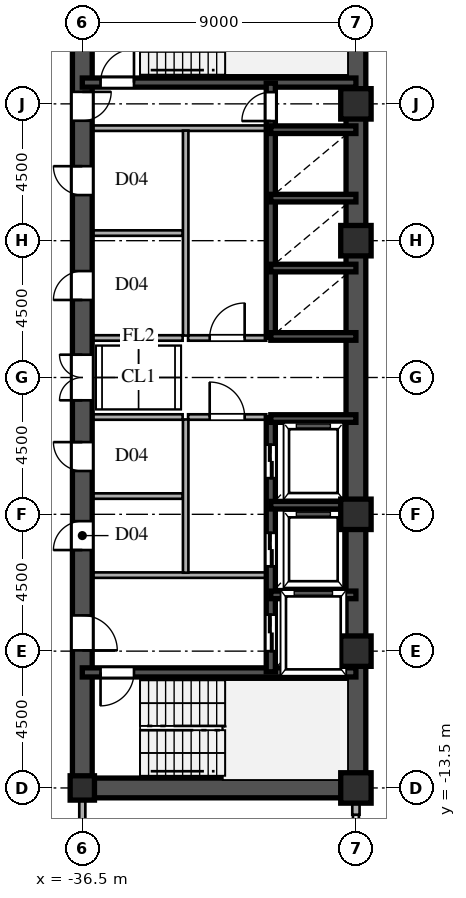
"""IFC4 building model, lengths in metres.
Left out: names, types, materials, properties, quantities, classifications, styles, units other than length and angle.
Written with IfcOpenShell. Run it as: python <this file> out.ifc"""

import sys

from ifc_helpers import new_model, si_unit, direction, frame, frame_2d, origin, origin_2d, place, context, subcontext, project, spatial, rectangle, hollow_rectangle, i_section, extrude, source, transform, mapped, element, fill, save


model = new_model("IFC4")
c1 = context("Model", 3, precision=1e-05, world=origin(), true_north=direction((0.0, 1.0)))
c2 = subcontext(c1, "Body", "Model", "MODEL_VIEW")
j1 = project(units=[si_unit("LENGTHUNIT", "METRE"), si_unit("PLANEANGLEUNIT", "RADIAN")], contexts=[c1])
p1 = place(None, origin())
s1 = spatial("IfcSite", under=j1, at=p1, CompositionType="ELEMENT")
p2 = place(p1, origin())
s2 = spatial("IfcBuilding", under=s1, at=p2, CompositionType="ELEMENT")
p3 = place(p2, frame((0.0, 0.0, 69.3)))
s3 = spatial("IfcBuildingStorey", under=s2, at=p3, CompositionType="ELEMENT", Elevation=69.3)
m1 = source(origin(), c2, "Body", "SweptSolid", [
    extrude(hollow_rectangle(XDim=1.0, YDim=1.0, WallThickness=0.042, at=origin_2d()), origin(), (0.0, 0.0, 1.0), 3.6),
])
for number, where, z_axis, x_axis in (
    (1, (-27.5, -13.5, 0.0), (0.0, 0.0, 1.0), (1.0, 0.0, 0.0)),
    (2, (-27.5, -9.0, 0.0), (0.0, 0.0, 1.0), (1.0, 0.0, 0.0)),
    (3, (-27.5, -4.5, 0.0), (0.0, 0.0, 1.0), (1.0, 0.0, 0.0)),
    (4, (-27.5, 4.5, 0.0), (0.0, 0.0, 1.0), (1.0, 0.0, 0.0)),
    (5, (-27.5, 9.0, 0.0), (0.0, 0.0, 1.0), (1.0, 0.0, 0.0)),
):
    element("IfcColumn", number, at=place(p3, frame(where, z_axis=z_axis, x_axis=x_axis)), inside=s3, PredefinedType="COLUMN", context=c2, shape_type="MappedRepresentation", body=[
        mapped(m1, transform((0.0, 0.0, 0.0), scale=1.0)),
    ])
m2 = source(origin(), c2, "Body", "SweptSolid", [
    extrude(i_section(OverallWidth=0.8, OverallDepth=0.8, WebThickness=0.032, FlangeThickness=0.05, at=origin_2d()), origin(), (0.0, 0.0, 1.0), 3.6),
])
p4 = place(p3, frame((-36.5, -13.5, 0.0), z_axis=(0.0, 0.0, 1.0), x_axis=(1.0, 0.0, 0.0)))
e6 = element("IfcColumn", 6, at=p4, inside=s3, PredefinedType="COLUMN", context=c2, shape_type="MappedRepresentation", body=[
    mapped(m2, transform((0.0, 0.0, 0.0), scale=1.0)),
])
p5 = place(p3, frame((-27.5, -14.38, 0.0), z_axis=(0.0, 0.0, 1.0), x_axis=(0.0, 1.0, 0.0)))
e7 = element("IfcWall", 7, at=p5, inside=s3, PredefinedType="SOLIDWALL", context=c2, shape_type="SweptSolid", body=[
    extrude(rectangle(XDim=0.55, YDim=0.24, at=frame_2d((0.275, 0.0))), origin(), (0.0, 0.0, 1.0), 2.88),
])
for number, where, z_axis, x_axis in (
    (8, (-27.5, -13.5, 0.0), (0.0, 0.0, 1.0), (0.0, 1.0, 0.0)),
    (9, (-27.5, 1.3, 0.0), (0.0, 0.0, 1.0), (0.0, 1.0, 0.0)),
):
    element("IfcWall", number, at=place(p3, frame(where, z_axis=z_axis, x_axis=x_axis)), inside=s3, PredefinedType="SHEAR", context=c2, shape_type="SweptSolid", body=[
        extrude(rectangle(XDim=12.2, YDim=0.65, at=frame_2d((6.1, 0.0))), origin(), (0.0, 0.0, 1.0), 3.38),
    ])
p6 = place(p3, frame((-27.5, -1.3, 0.0), z_axis=(0.0, 0.0, 1.0), x_axis=(0.0, 1.0, 0.0)))
e10 = element("IfcWall", 10, at=p6, inside=s3, PredefinedType="SHEAR", context=c2, shape_type="SweptSolid", body=[
    extrude(rectangle(XDim=2.6, YDim=0.65, at=frame_2d((1.3, 0.0))), origin(), (0.0, 0.0, 1.0), 3.38),
])
p7 = place(p3, frame((-36.5, -13.5, 0.0), z_axis=(0.0, 0.0, 1.0), x_axis=(1.0, 0.0, 0.0)))
e11 = element("IfcWall", 11, at=p7, inside=s3, PredefinedType="SHEAR", context=c2, shape_type="SweptSolid", body=[
    extrude(rectangle(XDim=9.0, YDim=0.65, at=frame_2d((4.5, 0.0))), origin(), (0.0, 0.0, 1.0), 3.38),
])
p8 = place(p3, frame((-36.5, -13.65, 0.0), z_axis=(0.0, 0.0, 1.0), x_axis=(0.0, 1.0, 0.0)))
e12 = element("IfcWall", 12, at=p8, inside=s3, PredefinedType="SHEAR", context=c2, shape_type="SweptSolid", body=[
    extrude(rectangle(XDim=7.15, YDim=0.65, at=frame_2d((3.575, 0.0))), origin(), (0.0, 0.0, 1.0), 3.38),
])
p9 = place(p8, frame((4.675, 0.0, 0.0)))
e13 = element("IfcOpeningElement", 13, at=p9, cuts=e12, PredefinedType="OPENING", context=c2, shape_type="SweptSolid", body=[
    extrude(rectangle(XDim=1.15, YDim=2.2, at=frame_2d((0.575, 1.1))), frame((0.0, 0.335, 0.0), z_axis=(0.0, -1.0, 0.0), x_axis=(1.0, 0.0, 0.0)), (0.0, 0.0, 1.0), 0.67),
])
p10 = place(p3, frame((-36.5, -1.3, 0.0), z_axis=(0.0, 0.0, 1.0), x_axis=(0.0, 1.0, 0.0)))
e14 = element("IfcWall", 14, at=p10, inside=s3, PredefinedType="SHEAR", context=c2, shape_type="SweptSolid", body=[
    extrude(rectangle(XDim=2.6, YDim=0.65, at=frame_2d((1.3, 0.0))), origin(), (0.0, 0.0, 1.0), 3.38),
])
p11 = place(p10, frame((0.55, 0.0, 0.0)))
e15 = element("IfcOpeningElement", 15, at=p11, cuts=e14, PredefinedType="OPENING", context=c2, shape_type="SweptSolid", body=[
    extrude(rectangle(XDim=1.5, YDim=2.3, at=frame_2d((0.75, 1.15))), frame((0.0, 0.335, 0.0), z_axis=(0.0, -1.0, 0.0), x_axis=(1.0, 0.0, 0.0)), (0.0, 0.0, 1.0), 0.67),
])
p12 = place(p3, frame((-36.5, 8.2, 0.0), z_axis=(0.0, 0.0, 1.0), x_axis=(0.0, 1.0, 0.0)))
e16 = element("IfcWall", 16, at=p12, inside=s3, PredefinedType="SHEAR", context=c2, shape_type="SweptSolid", body=[
    extrude(rectangle(XDim=5.45, YDim=0.65, at=frame_2d((2.725, 0.0))), origin(), (0.0, 0.0, 1.0), 3.38),
])
p13 = place(p12, frame((0.245, 0.0, 0.0)))
e17 = element("IfcOpeningElement", 17, at=p13, cuts=e16, PredefinedType="OPENING", context=c2, shape_type="SweptSolid", body=[
    extrude(rectangle(XDim=0.95, YDim=2.15, at=frame_2d((0.475, 1.075))), frame((0.0, 0.335, 0.0), z_axis=(0.0, -1.0, 0.0), x_axis=(1.0, 0.0, 0.0)), (0.0, 0.0, 1.0), 0.67),
])
p14 = place(p3, frame((-36.5, -6.5, 0.0), z_axis=(0.0, 0.0, 1.0), x_axis=(0.0, 1.0, 0.0)))
e18 = element("IfcWall", 18, at=p14, inside=s3, PredefinedType="SHEAR", context=c2, shape_type="SweptSolid", body=[
    extrude(rectangle(XDim=2.6, YDim=0.65, at=frame_2d((1.3, 0.0))), origin(), (0.0, 0.0, 1.0), 3.38),
])
p15 = place(p14, frame((0.825, 0.0, 0.0)))
e19 = element("IfcOpeningElement", 19, at=p15, cuts=e18, PredefinedType="OPENING", context=c2, shape_type="SweptSolid", body=[
    extrude(rectangle(XDim=0.95, YDim=2.15, at=frame_2d((0.475, 1.075))), frame((0.0, 0.335, 0.0), z_axis=(0.0, -1.0, 0.0), x_axis=(1.0, 0.0, 0.0)), (0.0, 0.0, 1.0), 0.67),
])
p16 = place(p3, frame((-36.5, -3.9, 0.0), z_axis=(0.0, 0.0, 1.0), x_axis=(0.0, 1.0, 0.0)))
e20 = element("IfcWall", 20, at=p16, inside=s3, PredefinedType="SHEAR", context=c2, shape_type="SweptSolid", body=[
    extrude(rectangle(XDim=2.6, YDim=0.65, at=frame_2d((1.3, 0.0))), origin(), (0.0, 0.0, 1.0), 3.38),
])
p17 = place(p16, frame((0.825, 0.0, 0.0)))
e21 = element("IfcOpeningElement", 21, at=p17, cuts=e20, PredefinedType="OPENING", context=c2, shape_type="SweptSolid", body=[
    extrude(rectangle(XDim=0.95, YDim=2.15, at=frame_2d((0.475, 1.075))), frame((0.0, 0.335, 0.0), z_axis=(0.0, -1.0, 0.0), x_axis=(1.0, 0.0, 0.0)), (0.0, 0.0, 1.0), 0.67),
])
p18 = place(p3, frame((-36.5, 1.3, 0.0), z_axis=(0.0, 0.0, 1.0), x_axis=(0.0, 1.0, 0.0)))
e22 = element("IfcWall", 22, at=p18, inside=s3, PredefinedType="SHEAR", context=c2, shape_type="SweptSolid", body=[
    extrude(rectangle(XDim=3.45, YDim=0.65, at=frame_2d((1.725, 0.0))), origin(), (0.0, 0.0, 1.0), 3.38),
])
p19 = place(p18, frame((1.25, 0.0, 0.0)))
e23 = element("IfcOpeningElement", 23, at=p19, cuts=e22, PredefinedType="OPENING", context=c2, shape_type="SweptSolid", body=[
    extrude(rectangle(XDim=0.95, YDim=2.15, at=frame_2d((0.475, 1.075))), frame((0.0, 0.335, 0.0), z_axis=(0.0, -1.0, 0.0), x_axis=(1.0, 0.0, 0.0)), (0.0, 0.0, 1.0), 0.67),
])
p20 = place(p3, frame((-36.5, 4.75, 0.0), z_axis=(0.0, 0.0, 1.0), x_axis=(0.0, 1.0, 0.0)))
e24 = element("IfcWall", 24, at=p20, inside=s3, PredefinedType="SHEAR", context=c2, shape_type="SweptSolid", body=[
    extrude(rectangle(XDim=3.45, YDim=0.65, at=frame_2d((1.725, 0.0))), origin(), (0.0, 0.0, 1.0), 3.38),
])
p21 = place(p20, frame((1.25, 0.0, 0.0)))
e25 = element("IfcOpeningElement", 25, at=p21, cuts=e24, PredefinedType="OPENING", context=c2, shape_type="SweptSolid", body=[
    extrude(rectangle(XDim=0.95, YDim=2.15, at=frame_2d((0.475, 1.075))), frame((0.0, 0.335, 0.0), z_axis=(0.0, -1.0, 0.0), x_axis=(1.0, 0.0, 0.0)), (0.0, 0.0, 1.0), 0.67),
])
p22 = place(p3, frame((-36.5, -9.7, 0.0), z_axis=(0.0, 0.0, 1.0), x_axis=(1.0, 0.0, 0.0)))
e26 = element("IfcWall", 26, at=p22, inside=s3, PredefinedType="SHEAR", context=c2, shape_type="SweptSolid", body=[
    extrude(rectangle(XDim=9.0, YDim=0.3, at=frame_2d((4.5, 0.0))), origin(), (0.0, 0.0, 1.0), 3.38),
])
p23 = place(p22, frame((0.6, 0.0, 0.0)))
e27 = element("IfcOpeningElement", 27, at=p23, cuts=e26, PredefinedType="OPENING", context=c2, shape_type="SweptSolid", body=[
    extrude(rectangle(XDim=1.1, YDim=2.2, at=frame_2d((0.55, 1.1))), frame((0.0, 0.16, 0.0), z_axis=(0.0, -1.0, 0.0), x_axis=(1.0, 0.0, 0.0)), (0.0, 0.0, 1.0), 0.32),
])
p24 = place(p3, frame((-36.5, 9.7, 0.0), z_axis=(0.0, 0.0, 1.0), x_axis=(1.0, 0.0, 0.0)))
e28 = element("IfcWall", 28, at=p24, inside=s3, PredefinedType="SHEAR", context=c2, shape_type="SweptSolid", body=[
    extrude(rectangle(XDim=9.0, YDim=0.3, at=frame_2d((4.5, 0.0))), origin(), (0.0, 0.0, 1.0), 3.38),
])
p25 = place(p24, frame((0.6, 0.0, 0.0)))
e29 = element("IfcOpeningElement", 29, at=p25, cuts=e28, PredefinedType="OPENING", context=c2, shape_type="SweptSolid", body=[
    extrude(rectangle(XDim=1.1, YDim=2.2, at=frame_2d((0.55, 1.1))), frame((0.0, 0.16, 0.0), z_axis=(0.0, -1.0, 0.0), x_axis=(1.0, 0.0, 0.0)), (0.0, 0.0, 1.0), 0.32),
])
for number, where, z_axis, x_axis in (
    (30, (-30.3, -7.15, 0.0), (0.0, 0.0, 1.0), (1.0, 0.0, 0.0)),
    (31, (-30.3, -4.2, 0.0), (0.0, 0.0, 1.0), (1.0, 0.0, 0.0)),
    (32, (-30.3, -1.35, 0.0), (0.0, 0.0, 1.0), (1.0, 0.0, 0.0)),
    (33, (-30.3, 1.35, 0.0), (0.0, 0.0, 1.0), (1.0, 0.0, 0.0)),
    (34, (-30.3, 3.6, 0.0), (0.0, 0.0, 1.0), (1.0, 0.0, 0.0)),
    (35, (-30.3, 5.9, 0.0), (0.0, 0.0, 1.0), (1.0, 0.0, 0.0)),
    (36, (-30.3, 8.15, 0.0), (0.0, 0.0, 1.0), (1.0, 0.0, 0.0)),
):
    element("IfcWall", number, at=place(p3, frame(where, z_axis=z_axis, x_axis=x_axis)), inside=s3, PredefinedType="SHEAR", context=c2, shape_type="SweptSolid", body=[
        extrude(rectangle(XDim=2.8, YDim=0.25, at=frame_2d((1.4, 0.0))), origin(), (0.0, 0.0, 1.0), 3.38),
    ])
p26 = place(p3, frame((-30.3, -9.68, 0.0), z_axis=(0.0, 0.0, 1.0), x_axis=(0.0, 1.0, 0.0)))
e37 = element("IfcWall", 37, at=p26, inside=s3, PredefinedType="SHEAR", context=c2, shape_type="SweptSolid", body=[
    extrude(rectangle(XDim=2.56, YDim=0.3, at=frame_2d((1.28, 0.0))), origin(), (0.0, 0.0, 1.0), 3.38),
])
p27 = place(p26, frame((0.68, 0.0, 0.0)))
e38 = element("IfcOpeningElement", 38, at=p27, cuts=e37, PredefinedType="OPENING", context=c2, shape_type="SweptSolid", body=[
    extrude(rectangle(XDim=1.2, YDim=2.25, at=frame_2d((0.6, 1.125))), frame((0.0, 0.16, 0.0), z_axis=(0.0, -1.0, 0.0), x_axis=(1.0, 0.0, 0.0)), (0.0, 0.0, 1.0), 0.32),
])
p28 = place(p3, frame((-30.3, -7.12, 0.0), z_axis=(0.0, 0.0, 1.0), x_axis=(0.0, 1.0, 0.0)))
e39 = element("IfcWall", 39, at=p28, inside=s3, PredefinedType="SHEAR", context=c2, shape_type="SweptSolid", body=[
    extrude(rectangle(XDim=2.92, YDim=0.3, at=frame_2d((1.46, 0.0))), origin(), (0.0, 0.0, 1.0), 3.38),
])
p29 = place(p28, frame((0.91, 0.0, 0.0)))
e40 = element("IfcOpeningElement", 40, at=p29, cuts=e39, PredefinedType="OPENING", context=c2, shape_type="SweptSolid", body=[
    extrude(rectangle(XDim=1.1, YDim=2.2, at=frame_2d((0.55, 1.1))), frame((0.0, 0.16, 0.0), z_axis=(0.0, -1.0, 0.0), x_axis=(1.0, 0.0, 0.0)), (0.0, 0.0, 1.0), 0.32),
])
p30 = place(p3, frame((-30.3, -4.2, 0.0), z_axis=(0.0, 0.0, 1.0), x_axis=(0.0, 1.0, 0.0)))
e41 = element("IfcWall", 41, at=p30, inside=s3, PredefinedType="SHEAR", context=c2, shape_type="SweptSolid", body=[
    extrude(rectangle(XDim=2.88, YDim=0.3, at=frame_2d((1.44, 0.0))), origin(), (0.0, 0.0, 1.0), 3.38),
])
p31 = place(p30, frame((0.89, 0.0, 0.0)))
e42 = element("IfcOpeningElement", 42, at=p31, cuts=e41, PredefinedType="OPENING", context=c2, shape_type="SweptSolid", body=[
    extrude(rectangle(XDim=1.1, YDim=2.2, at=frame_2d((0.55, 1.1))), frame((0.0, 0.16, 0.0), z_axis=(0.0, -1.0, 0.0), x_axis=(1.0, 0.0, 0.0)), (0.0, 0.0, 1.0), 0.32),
])
p32 = place(p3, frame((-30.3, 1.32, 0.0), z_axis=(0.0, 0.0, 1.0), x_axis=(0.0, 1.0, 0.0)))
e43 = element("IfcWall", 43, at=p32, inside=s3, PredefinedType="SHEAR", context=c2, shape_type="SweptSolid", body=[
    extrude(rectangle(XDim=2.28, YDim=0.3, at=frame_2d((1.14, 0.0))), origin(), (0.0, 0.0, 1.0), 3.38),
])
p33 = place(p3, frame((-30.3, 3.6, 0.0), z_axis=(0.0, 0.0, 1.0), x_axis=(0.0, 1.0, 0.0)))
e44 = element("IfcWall", 44, at=p33, inside=s3, PredefinedType="SHEAR", context=c2, shape_type="SweptSolid", body=[
    extrude(rectangle(XDim=2.3, YDim=0.3, at=frame_2d((1.15, 0.0))), origin(), (0.0, 0.0, 1.0), 3.38),
])
p34 = place(p3, frame((-30.3, 5.9, 0.0), z_axis=(0.0, 0.0, 1.0), x_axis=(0.0, 1.0, 0.0)))
e45 = element("IfcWall", 45, at=p34, inside=s3, PredefinedType="SHEAR", context=c2, shape_type="SweptSolid", body=[
    extrude(rectangle(XDim=2.25, YDim=0.3, at=frame_2d((1.125, 0.0))), origin(), (0.0, 0.0, 1.0), 3.38),
])
p35 = place(p3, frame((-30.3, 8.15, 0.0), z_axis=(0.0, 0.0, 1.0), x_axis=(0.0, 1.0, 0.0)))
e46 = element("IfcWall", 46, at=p35, inside=s3, PredefinedType="SHEAR", context=c2, shape_type="SweptSolid", body=[
    extrude(rectangle(XDim=1.53, YDim=0.3, at=frame_2d((0.765, 0.0))), origin(), (0.0, 0.0, 1.0), 3.38),
])
p36 = place(p35, frame((0.285, 0.0, 0.0)))
e47 = element("IfcOpeningElement", 47, at=p36, cuts=e46, PredefinedType="OPENING", context=c2, shape_type="SweptSolid", body=[
    extrude(rectangle(XDim=0.95, YDim=2.15, at=frame_2d((0.475, 1.075))), frame((0.0, 0.16, 0.0), z_axis=(0.0, -1.0, 0.0), x_axis=(1.0, 0.0, 0.0)), (0.0, 0.0, 1.0), 0.32),
])
for number, where, z_axis, x_axis in (
    (48, (-36.15, -6.5, 0.0), (0.0, 0.0, 1.0), (1.0, 0.0, 0.0)),
    (49, (-36.15, 8.2, 0.0), (0.0, 0.0, 1.0), (1.0, 0.0, 0.0)),
):
    element("IfcWall", number, at=place(p3, frame(where, z_axis=z_axis, x_axis=x_axis)), inside=s3, PredefinedType="PARTITIONING", context=c2, shape_type="SweptSolid", body=[
        extrude(rectangle(XDim=5.7, YDim=0.18, at=frame_2d((2.85, 0.0))), origin(), (0.0, 0.0, 1.0), 3.38),
    ])
p37 = place(p3, frame((-33.1, -6.42, 0.0), z_axis=(0.0, 0.0, 1.0), x_axis=(0.0, 1.0, 0.0)))
e50 = element("IfcWall", 50, at=p37, inside=s3, PredefinedType="PARTITIONING", context=c2, shape_type="SweptSolid", body=[
    extrude(rectangle(XDim=5.04, YDim=0.18, at=frame_2d((2.52, 0.0))), origin(), (0.0, 0.0, 1.0), 3.38),
])
p38 = place(p3, frame((-33.1, 1.38, 0.0), z_axis=(0.0, 0.0, 1.0), x_axis=(0.0, 1.0, 0.0)))
e51 = element("IfcWall", 51, at=p38, inside=s3, PredefinedType="PARTITIONING", context=c2, shape_type="SweptSolid", body=[
    extrude(rectangle(XDim=6.74, YDim=0.18, at=frame_2d((3.37, 0.0))), origin(), (0.0, 0.0, 1.0), 3.38),
])
p39 = place(p3, frame((-33.02, -1.3, 0.0), z_axis=(0.0, 0.0, 1.0), x_axis=(1.0, 0.0, 0.0)))
e52 = element("IfcWall", 52, at=p39, inside=s3, PredefinedType="PARTITIONING", context=c2, shape_type="SweptSolid", body=[
    extrude(rectangle(XDim=2.57, YDim=0.18, at=frame_2d((1.285, 0.0))), origin(), (0.0, 0.0, 1.0), 3.38),
])
p40 = place(p39, frame((0.71, 0.0, 0.0)))
e53 = element("IfcOpeningElement", 53, at=p40, cuts=e52, PredefinedType="OPENING", context=c2, shape_type="SweptSolid", body=[
    extrude(rectangle(XDim=1.15, YDim=2.2, at=frame_2d((0.575, 1.1))), frame((0.0, 0.1, 0.0), z_axis=(0.0, -1.0, 0.0), x_axis=(1.0, 0.0, 0.0)), (0.0, 0.0, 1.0), 0.2),
])
p41 = place(p3, frame((-33.02, 1.3, 0.0), z_axis=(0.0, 0.0, 1.0), x_axis=(1.0, 0.0, 0.0)))
e54 = element("IfcWall", 54, at=p41, inside=s3, PredefinedType="PARTITIONING", context=c2, shape_type="SweptSolid", body=[
    extrude(rectangle(XDim=2.57, YDim=0.18, at=frame_2d((1.285, 0.0))), origin(), (0.0, 0.0, 1.0), 3.38),
])
p42 = place(p41, frame((0.71, 0.0, 0.0)))
e55 = element("IfcOpeningElement", 55, at=p42, cuts=e54, PredefinedType="OPENING", context=c2, shape_type="SweptSolid", body=[
    extrude(rectangle(XDim=1.15, YDim=2.2, at=frame_2d((0.575, 1.1))), frame((0.0, 0.1, 0.0), z_axis=(0.0, -1.0, 0.0), x_axis=(1.0, 0.0, 0.0)), (0.0, 0.0, 1.0), 0.2),
])
for number, where, z_axis, x_axis in (
    (56, (-36.15, -1.3, 0.0), (0.0, 0.0, 1.0), (1.0, 0.0, 0.0)),
    (57, (-36.15, 1.3, 0.0), (0.0, 0.0, 1.0), (1.0, 0.0, 0.0)),
    (58, (-36.15, -3.9, 0.0), (0.0, 0.0, 1.0), (1.0, 0.0, 0.0)),
    (59, (-36.15, 4.75, 0.0), (0.0, 0.0, 1.0), (1.0, 0.0, 0.0)),
):
    element("IfcWall", number, at=place(p3, frame(where, z_axis=z_axis, x_axis=x_axis)), inside=s3, PredefinedType="PARTITIONING", context=c2, shape_type="SweptSolid", body=[
        extrude(rectangle(XDim=2.95, YDim=0.18, at=frame_2d((1.475, 0.0))), origin(), (0.0, 0.0, 1.0), 3.38),
    ])
p43 = place(p3, frame((-36.5, -15.515, 0.0), z_axis=(0.0, 0.0, 1.0), x_axis=(0.0, 1.0, 0.0)))
e60 = element("IfcWall", 60, at=p43, inside=s3, PredefinedType="PARTITIONING", context=c2, shape_type="SweptSolid", body=[
    extrude(rectangle(XDim=1.685, YDim=0.2, at=frame_2d((0.842, 0.0))), origin(), (0.0, 0.0, 1.0), 2.68),
])
m3 = source(origin(), c2, "Body", "SweptSolid", [
    extrude(rectangle(XDim=1.15, YDim=2.2, at=frame_2d((0.575, 1.1))), frame((0.0, 0.025, 0.0), z_axis=(0.0, -1.0, 0.0), x_axis=(1.0, 0.0, 0.0)), (0.0, 0.0, 1.0), 0.05),
])
p44 = place(p9, frame((1.15, 0.0, 0.0), z_axis=(0.0, 0.0, 1.0), x_axis=(-1.0, 0.0, 0.0)))
e61 = element("IfcDoor", 61, at=p44, inside=s3, OperationType="SINGLE_SWING_LEFT", PredefinedType="DOOR", context=c2, shape_type="MappedRepresentation", body=[
    mapped(m3, transform((0.0, 0.0, 0.0), scale=1.0)),
])
fill(e13, e61)
m4 = source(origin(), c2, "Body", "SweptSolid", [
    extrude(rectangle(XDim=1.5, YDim=2.3, at=frame_2d((0.75, 1.15))), frame((0.0, 0.025, 0.0), z_axis=(0.0, -1.0, 0.0), x_axis=(1.0, 0.0, 0.0)), (0.0, 0.0, 1.0), 0.05),
])
p45 = place(p11, origin())
e62 = element("IfcDoor", 62, at=p45, inside=s3, OperationType="DOUBLE_SWING_LEFT", PredefinedType="DOOR", context=c2, shape_type="MappedRepresentation", body=[
    mapped(m4, transform((0.0, 0.0, 0.0), scale=1.0)),
])
fill(e15, e62)
m5 = source(origin(), c2, "Body", "SweptSolid", [
    extrude(rectangle(XDim=0.95, YDim=2.15, at=frame_2d((0.475, 1.075))), frame((0.0, 0.025, 0.0), z_axis=(0.0, -1.0, 0.0), x_axis=(1.0, 0.0, 0.0)), (0.0, 0.0, 1.0), 0.05),
])
p46 = place(p13, frame((0.95, 0.0, 0.0), z_axis=(0.0, 0.0, 1.0), x_axis=(-1.0, 0.0, 0.0)))
e63 = element("IfcDoor", 63, at=p46, inside=s3, OperationType="SINGLE_SWING_RIGHT", PredefinedType="DOOR", context=c2, shape_type="MappedRepresentation", body=[
    mapped(m5, transform((0.0, 0.0, 0.0), scale=1.0)),
])
fill(e17, e63)
p47 = place(p15, origin())
e64 = element("IfcDoor", 64, at=p47, inside=s3, OperationType="SINGLE_SWING_LEFT", PredefinedType="DOOR", context=c2, shape_type="MappedRepresentation", body=[
    mapped(m5, transform((0.0, 0.0, 0.0), scale=1.0)),
])
fill(e19, e64)
p48 = place(p17, origin())
e65 = element("IfcDoor", 65, at=p48, inside=s3, OperationType="SINGLE_SWING_RIGHT", PredefinedType="DOOR", context=c2, shape_type="MappedRepresentation", body=[
    mapped(m5, transform((0.0, 0.0, 0.0), scale=1.0)),
])
fill(e21, e65)
p49 = place(p19, origin())
e66 = element("IfcDoor", 66, at=p49, inside=s3, OperationType="SINGLE_SWING_LEFT", PredefinedType="DOOR", context=c2, shape_type="MappedRepresentation", body=[
    mapped(m5, transform((0.0, 0.0, 0.0), scale=1.0)),
])
fill(e23, e66)
p50 = place(p21, origin())
e67 = element("IfcDoor", 67, at=p50, inside=s3, OperationType="SINGLE_SWING_RIGHT", PredefinedType="DOOR", context=c2, shape_type="MappedRepresentation", body=[
    mapped(m5, transform((0.0, 0.0, 0.0), scale=1.0)),
])
fill(e25, e67)
m6 = source(origin(), c2, "Body", "SweptSolid", [
    extrude(rectangle(XDim=1.1, YDim=2.2, at=frame_2d((0.55, 1.1))), frame((0.0, 0.025, 0.0), z_axis=(0.0, -1.0, 0.0), x_axis=(1.0, 0.0, 0.0)), (0.0, 0.0, 1.0), 0.05),
])
p51 = place(p23, frame((1.1, 0.0, 0.0), z_axis=(0.0, 0.0, 1.0), x_axis=(-1.0, 0.0, 0.0)))
e68 = element("IfcDoor", 68, at=p51, inside=s3, OperationType="SINGLE_SWING_LEFT", PredefinedType="DOOR", context=c2, shape_type="MappedRepresentation", body=[
    mapped(m6, transform((0.0, 0.0, 0.0), scale=1.0)),
])
fill(e27, e68)
p52 = place(p25, origin())
e69 = element("IfcDoor", 69, at=p52, inside=s3, OperationType="SINGLE_SWING_RIGHT", PredefinedType="DOOR", context=c2, shape_type="MappedRepresentation", body=[
    mapped(m6, transform((0.0, 0.0, 0.0), scale=1.0)),
])
fill(e29, e69)
m7 = source(origin(), c2, "Body", "SweptSolid", [
    extrude(rectangle(XDim=1.2, YDim=2.25, at=frame_2d((0.6, 1.125))), frame((0.0, 0.025, 0.0), z_axis=(0.0, -1.0, 0.0), x_axis=(1.0, 0.0, 0.0)), (0.0, 0.0, 1.0), 0.05),
])
p53 = place(p27, origin())
e70 = element("IfcDoor", 70, at=p53, inside=s3, OperationType="DOUBLE_DOOR_SLIDING", PredefinedType="DOOR", context=c2, shape_type="MappedRepresentation", body=[
    mapped(m7, transform((0.0, 0.0, 0.0), scale=1.0)),
])
fill(e38, e70)
m8 = source(origin(), c2, "Body", "SweptSolid", [
    extrude(rectangle(XDim=1.1, YDim=2.2, at=frame_2d((0.55, 1.1))), frame((0.0, 0.025, 0.0), z_axis=(0.0, -1.0, 0.0), x_axis=(1.0, 0.0, 0.0)), (0.0, 0.0, 1.0), 0.05),
])
p54 = place(p29, origin())
e71 = element("IfcDoor", 71, at=p54, inside=s3, OperationType="DOUBLE_DOOR_SLIDING", PredefinedType="DOOR", context=c2, shape_type="MappedRepresentation", body=[
    mapped(m8, transform((0.0, 0.0, 0.0), scale=1.0)),
])
fill(e40, e71)
p55 = place(p31, origin())
e72 = element("IfcDoor", 72, at=p55, inside=s3, OperationType="DOUBLE_DOOR_SLIDING", PredefinedType="DOOR", context=c2, shape_type="MappedRepresentation", body=[
    mapped(m8, transform((0.0, 0.0, 0.0), scale=1.0)),
])
fill(e42, e72)
p56 = place(p36, origin())
e73 = element("IfcDoor", 73, at=p56, inside=s3, OperationType="SINGLE_SWING_LEFT", PredefinedType="DOOR", context=c2, shape_type="MappedRepresentation", body=[
    mapped(m5, transform((0.0, 0.0, 0.0), scale=1.0)),
])
fill(e47, e73)
p57 = place(p40, origin())
e74 = element("IfcDoor", 74, at=p57, inside=s3, OperationType="SINGLE_SWING_LEFT", PredefinedType="DOOR", context=c2, shape_type="MappedRepresentation", body=[
    mapped(m3, transform((0.0, 0.0, 0.0), scale=1.0)),
])
fill(e53, e74)
p58 = place(p42, origin())
e75 = element("IfcDoor", 75, at=p58, inside=s3, OperationType="SINGLE_SWING_RIGHT", PredefinedType="DOOR", context=c2, shape_type="MappedRepresentation", body=[
    mapped(m3, transform((0.0, 0.0, 0.0), scale=1.0)),
])
fill(e55, e75)
save(model, sys.argv[1])
